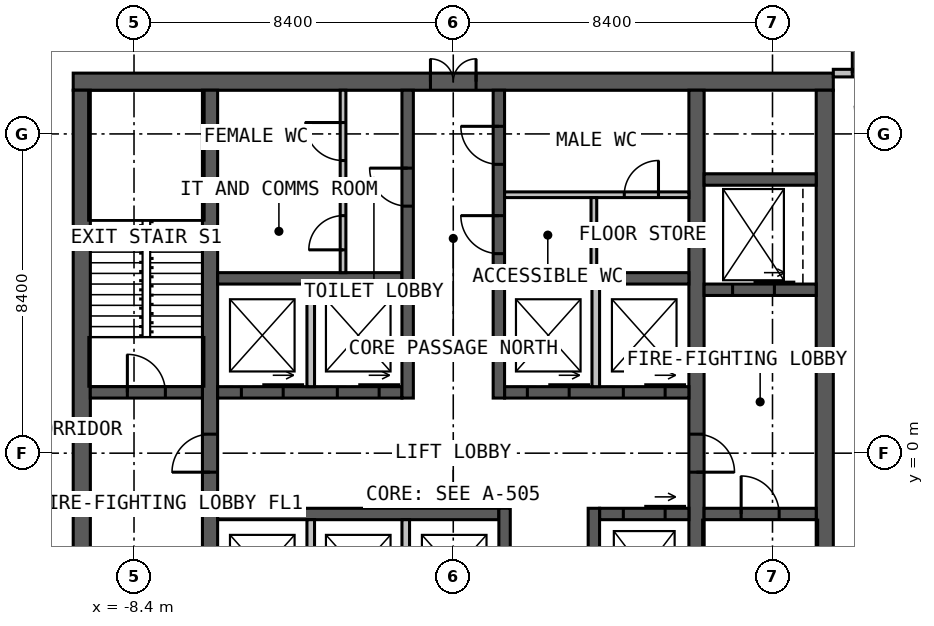
"""IFC4 building model, lengths in metres.
Left out: names, types, materials, properties, quantities, classifications, styles, units other than length and angle.
Written with IfcOpenShell. Run it as: python <this file> out.ifc"""

import sys

from ifc_helpers import new_model, si_unit, direction, frame, frame_2d, origin, place, context, subcontext, project, spatial, rectangle, extrude, element, fill, save


model = new_model("IFC4")
c1 = context("Model", 3, precision=1e-05, world=origin(), true_north=direction((0.0, 1.0)))
c2 = subcontext(c1, "Body", "Model", "MODEL_VIEW")
j1 = project(units=[si_unit("LENGTHUNIT", "METRE"), si_unit("PLANEANGLEUNIT", "RADIAN")], contexts=[c1])
p1 = place(None, origin())
s1 = spatial("IfcSite", under=j1, at=p1, CompositionType="ELEMENT")
p2 = place(p1, origin())
s2 = spatial("IfcBuilding", under=s1, at=p2, CompositionType="ELEMENT")
p3 = place(p2, frame((0.0, 0.0, 207.0)))
s3 = spatial("IfcBuildingStorey", under=s2, at=p3, CompositionType="ELEMENT", Elevation=207.0)
p4 = place(p3, frame((-10.0, 9.775, 0.0), z_axis=(0.0, 0.0, 1.0), x_axis=(1.0, 0.0, 0.0)))
e1 = element("IfcWall", 1, at=p4, inside=s3, PredefinedType="SOLIDWALL", context=c2, shape_type="SweptSolid", body=[
    extrude(rectangle(XDim=20.0, YDim=0.45, at=frame_2d((10.0, 0.0))), origin(), (0.0, 0.0, 1.0), 4.0),
])
p5 = place(p4, frame((9.4, 0.0, 0.0)))
e2 = element("IfcOpeningElement", 2, at=p5, cuts=e1, PredefinedType="OPENING", context=c2, shape_type="SweptSolid", body=[
    extrude(rectangle(XDim=1.2, YDim=2.2, at=frame_2d((0.6, 1.1))), frame((0.0, 0.235, 0.0), z_axis=(0.0, -1.0, 0.0), x_axis=(1.0, 0.0, 0.0)), (0.0, 0.0, 1.0), 0.47),
])
for number, where, z_axis, x_axis in (
    (3, (9.775, -9.55, 0.0), (0.0, 0.0, 1.0), (0.0, 1.0, 0.0)),
    (4, (-9.775, 9.55, 0.0), (0.0, 0.0, 1.0), (0.0, -1.0, 0.0)),
):
    element("IfcWall", number, at=place(p3, frame(where, z_axis=z_axis, x_axis=x_axis)), inside=s3, PredefinedType="SOLIDWALL", context=c2, shape_type="SweptSolid", body=[
        extrude(rectangle(XDim=19.1, YDim=0.45, at=frame_2d((9.55, 0.0))), origin(), (0.0, 0.0, 1.0), 4.0),
    ])
p6 = place(p3, frame((-6.4, -9.55, 0.0), z_axis=(0.0, 0.0, 1.0), x_axis=(0.0, 1.0, 0.0)))
e5 = element("IfcWall", 5, at=p6, inside=s3, PredefinedType="SOLIDWALL", context=c2, shape_type="SweptSolid", body=[
    extrude(rectangle(XDim=19.1, YDim=0.4, at=frame_2d((9.55, 0.0))), origin(), (0.0, 0.0, 1.0), 4.0),
])
p7 = place(p6, frame((9.05, 0.0, 0.0)))
e6 = element("IfcOpeningElement", 6, at=p7, cuts=e5, PredefinedType="OPENING", context=c2, shape_type="SweptSolid", body=[
    extrude(rectangle(XDim=1.0, YDim=2.2, at=frame_2d((0.5, 1.1))), frame((0.0, 0.21, 0.0), z_axis=(0.0, -1.0, 0.0), x_axis=(1.0, 0.0, 0.0)), (0.0, 0.0, 1.0), 0.42),
])
p8 = place(p3, frame((6.4, 9.55, 0.0), z_axis=(0.0, 0.0, 1.0), x_axis=(0.0, -1.0, 0.0)))
e7 = element("IfcWall", 7, at=p8, inside=s3, PredefinedType="SOLIDWALL", context=c2, shape_type="SweptSolid", body=[
    extrude(rectangle(XDim=19.1, YDim=0.4, at=frame_2d((9.55, 0.0))), origin(), (0.0, 0.0, 1.0), 4.0),
])
p9 = place(p8, frame((9.05, 0.0, 0.0)))
e8 = element("IfcOpeningElement", 8, at=p9, cuts=e7, PredefinedType="OPENING", context=c2, shape_type="SweptSolid", body=[
    extrude(rectangle(XDim=1.0, YDim=2.2, at=frame_2d((0.5, 1.1))), frame((0.0, 0.21, 0.0), z_axis=(0.0, -1.0, 0.0), x_axis=(1.0, 0.0, 0.0)), (0.0, 0.0, 1.0), 0.42),
])
p10 = place(p3, frame((-6.2, 1.6, 0.0), z_axis=(0.0, 0.0, 1.0), x_axis=(1.0, 0.0, 0.0)))
e9 = element("IfcWall", 9, at=p10, inside=s3, PredefinedType="SOLIDWALL", context=c2, shape_type="SweptSolid", body=[
    extrude(rectangle(XDim=4.85, YDim=0.3, at=frame_2d((2.425, 0.0))), origin(), (0.0, 0.0, 1.0), 4.0),
])
p11 = place(p10, frame((0.625, 0.0, 0.0)))
e10 = element("IfcOpeningElement", 10, at=p11, cuts=e9, PredefinedType="OPENING", context=c2, shape_type="SweptSolid", body=[
    extrude(rectangle(XDim=1.1, YDim=2.2, at=frame_2d((0.55, 1.1))), frame((0.0, 0.16, 0.0), z_axis=(0.0, -1.0, 0.0), x_axis=(1.0, 0.0, 0.0)), (0.0, 0.0, 1.0), 0.32),
])
p12 = place(p10, frame((3.15, 0.0, 0.0)))
e11 = element("IfcOpeningElement", 11, at=p12, cuts=e9, PredefinedType="OPENING", context=c2, shape_type="SweptSolid", body=[
    extrude(rectangle(XDim=1.1, YDim=2.2, at=frame_2d((0.55, 1.1))), frame((0.0, 0.16, 0.0), z_axis=(0.0, -1.0, 0.0), x_axis=(1.0, 0.0, 0.0)), (0.0, 0.0, 1.0), 0.32),
])
p13 = place(p3, frame((1.35, 1.6, 0.0), z_axis=(0.0, 0.0, 1.0), x_axis=(1.0, 0.0, 0.0)))
e12 = element("IfcWall", 12, at=p13, inside=s3, PredefinedType="SOLIDWALL", context=c2, shape_type="SweptSolid", body=[
    extrude(rectangle(XDim=4.85, YDim=0.3, at=frame_2d((2.425, 0.0))), origin(), (0.0, 0.0, 1.0), 4.0),
])
p14 = place(p13, frame((0.6, 0.0, 0.0)))
e13 = element("IfcOpeningElement", 13, at=p14, cuts=e12, PredefinedType="OPENING", context=c2, shape_type="SweptSolid", body=[
    extrude(rectangle(XDim=1.1, YDim=2.2, at=frame_2d((0.55, 1.1))), frame((0.0, 0.16, 0.0), z_axis=(0.0, -1.0, 0.0), x_axis=(1.0, 0.0, 0.0)), (0.0, 0.0, 1.0), 0.32),
])
p15 = place(p13, frame((3.125, 0.0, 0.0)))
e14 = element("IfcOpeningElement", 14, at=p15, cuts=e12, PredefinedType="OPENING", context=c2, shape_type="SweptSolid", body=[
    extrude(rectangle(XDim=1.1, YDim=2.2, at=frame_2d((0.55, 1.1))), frame((0.0, 0.16, 0.0), z_axis=(0.0, -1.0, 0.0), x_axis=(1.0, 0.0, 0.0)), (0.0, 0.0, 1.0), 0.32),
])
for number, where, z_axis, x_axis in (
    (15, (-6.2, 4.6, 0.0), (0.0, 0.0, 1.0), (1.0, 0.0, 0.0)),
    (16, (1.35, 4.6, 0.0), (0.0, 0.0, 1.0), (1.0, 0.0, 0.0)),
):
    element("IfcWall", number, at=place(p3, frame(where, z_axis=z_axis, x_axis=x_axis)), inside=s3, PredefinedType="SOLIDWALL", context=c2, shape_type="SweptSolid", body=[
        extrude(rectangle(XDim=4.85, YDim=0.3, at=frame_2d((2.425, 0.0))), origin(), (0.0, 0.0, 1.0), 4.0),
    ])
p16 = place(p3, frame((-1.2, 1.45, 0.0), z_axis=(0.0, 0.0, 1.0), x_axis=(0.0, 1.0, 0.0)))
e17 = element("IfcWall", 17, at=p16, inside=s3, PredefinedType="SOLIDWALL", context=c2, shape_type="SweptSolid", body=[
    extrude(rectangle(XDim=8.1, YDim=0.3, at=frame_2d((4.05, 0.0))), origin(), (0.0, 0.0, 1.0), 4.0),
])
p17 = place(p16, frame((5.05, 0.0, 0.0)))
e18 = element("IfcOpeningElement", 18, at=p17, cuts=e17, PredefinedType="OPENING", context=c2, shape_type="SweptSolid", body=[
    extrude(rectangle(XDim=1.0, YDim=2.2, at=frame_2d((0.5, 1.1))), frame((0.0, 0.16, 0.0), z_axis=(0.0, -1.0, 0.0), x_axis=(1.0, 0.0, 0.0)), (0.0, 0.0, 1.0), 0.32),
])
p18 = place(p3, frame((1.2, 1.45, 0.0), z_axis=(0.0, 0.0, 1.0), x_axis=(0.0, 1.0, 0.0)))
e19 = element("IfcWall", 19, at=p18, inside=s3, PredefinedType="SOLIDWALL", context=c2, shape_type="SweptSolid", body=[
    extrude(rectangle(XDim=8.1, YDim=0.3, at=frame_2d((4.05, 0.0))), origin(), (0.0, 0.0, 1.0), 4.0),
])
p19 = place(p18, frame((3.8, 0.0, 0.0)))
e20 = element("IfcOpeningElement", 20, at=p19, cuts=e19, PredefinedType="OPENING", context=c2, shape_type="SweptSolid", body=[
    extrude(rectangle(XDim=1.0, YDim=2.2, at=frame_2d((0.5, 1.1))), frame((0.0, 0.16, 0.0), z_axis=(0.0, -1.0, 0.0), x_axis=(1.0, 0.0, 0.0)), (0.0, 0.0, 1.0), 0.32),
])
p20 = place(p18, frame((6.15, 0.0, 0.0)))
e21 = element("IfcOpeningElement", 21, at=p20, cuts=e19, PredefinedType="OPENING", context=c2, shape_type="SweptSolid", body=[
    extrude(rectangle(XDim=1.0, YDim=2.2, at=frame_2d((0.5, 1.1))), frame((0.0, 0.16, 0.0), z_axis=(0.0, -1.0, 0.0), x_axis=(1.0, 0.0, 0.0)), (0.0, 0.0, 1.0), 0.32),
])
p21 = place(p3, frame((-6.2, -1.6, 0.0), z_axis=(0.0, 0.0, 1.0), x_axis=(1.0, 0.0, 0.0)))
e22 = element("IfcWall", 22, at=p21, inside=s3, PredefinedType="SOLIDWALL", context=c2, shape_type="SweptSolid", body=[
    extrude(rectangle(XDim=7.4, YDim=0.3, at=frame_2d((3.7, 0.0))), origin(), (0.0, 0.0, 1.0), 4.0),
])
p22 = place(p3, frame((3.85, -1.6, 0.0), z_axis=(0.0, 0.0, 1.0), x_axis=(1.0, 0.0, 0.0)))
e23 = element("IfcWall", 23, at=p22, inside=s3, PredefinedType="SOLIDWALL", context=c2, shape_type="SweptSolid", body=[
    extrude(rectangle(XDim=2.35, YDim=0.3, at=frame_2d((1.175, 0.0))), origin(), (0.0, 0.0, 1.0), 4.0),
])
p23 = place(p22, frame((0.625, 0.0, 0.0)))
e24 = element("IfcOpeningElement", 24, at=p23, cuts=e23, PredefinedType="OPENING", context=c2, shape_type="SweptSolid", body=[
    extrude(rectangle(XDim=1.1, YDim=2.2, at=frame_2d((0.55, 1.1))), frame((0.0, 0.16, 0.0), z_axis=(0.0, -1.0, 0.0), x_axis=(1.0, 0.0, 0.0)), (0.0, 0.0, 1.0), 0.32),
])
p24 = place(p3, frame((1.35, -1.45, 0.0), z_axis=(0.0, 0.0, 1.0), x_axis=(0.0, -1.0, 0.0)))
e25 = element("IfcWall", 25, at=p24, inside=s3, PredefinedType="SOLIDWALL", context=c2, shape_type="SweptSolid", body=[
    extrude(rectangle(XDim=8.1, YDim=0.3, at=frame_2d((4.05, 0.0))), origin(), (0.0, 0.0, 1.0), 4.0),
])
p25 = place(p24, frame((5.975, 0.0, 0.0)))
e26 = element("IfcOpeningElement", 26, at=p25, cuts=e25, PredefinedType="OPENING", context=c2, shape_type="SweptSolid", body=[
    extrude(rectangle(XDim=1.0, YDim=2.2, at=frame_2d((0.5, 1.1))), frame((0.0, 0.16, 0.0), z_axis=(0.0, -1.0, 0.0), x_axis=(1.0, 0.0, 0.0)), (0.0, 0.0, 1.0), 0.32),
])
p26 = place(p24, frame((3.525, 0.0, 0.0)))
e27 = element("IfcOpeningElement", 27, at=p26, cuts=e25, PredefinedType="OPENING", context=c2, shape_type="SweptSolid", body=[
    extrude(rectangle(XDim=0.9, YDim=2.2, at=frame_2d((0.45, 1.1))), frame((0.0, 0.16, 0.0), z_axis=(0.0, -1.0, 0.0), x_axis=(1.0, 0.0, 0.0)), (0.0, 0.0, 1.0), 0.32),
])
p27 = place(p3, frame((3.7, -1.45, 0.0), z_axis=(0.0, 0.0, 1.0), x_axis=(0.0, -1.0, 0.0)))
e28 = element("IfcWall", 28, at=p27, inside=s3, PredefinedType="SOLIDWALL", context=c2, shape_type="SweptSolid", body=[
    extrude(rectangle(XDim=8.1, YDim=0.3, at=frame_2d((4.05, 0.0))), origin(), (0.0, 0.0, 1.0), 4.0),
])
p28 = place(p27, frame((5.1, 0.0, 0.0)))
e29 = element("IfcOpeningElement", 29, at=p28, cuts=e28, PredefinedType="OPENING", context=c2, shape_type="SweptSolid", body=[
    extrude(rectangle(XDim=0.9, YDim=2.2, at=frame_2d((0.45, 1.1))), frame((0.0, 0.16, 0.0), z_axis=(0.0, -1.0, 0.0), x_axis=(1.0, 0.0, 0.0)), (0.0, 0.0, 1.0), 0.32),
])
p29 = place(p3, frame((-9.55, 1.6, 0.0), z_axis=(0.0, 0.0, 1.0), x_axis=(1.0, 0.0, 0.0)))
e30 = element("IfcWall", 30, at=p29, inside=s3, PredefinedType="SOLIDWALL", context=c2, shape_type="SweptSolid", body=[
    extrude(rectangle(XDim=2.95, YDim=0.3, at=frame_2d((1.475, 0.0))), origin(), (0.0, 0.0, 1.0), 4.0),
])
p30 = place(p29, frame((0.975, 0.0, 0.0)))
e31 = element("IfcOpeningElement", 31, at=p30, cuts=e30, PredefinedType="OPENING", context=c2, shape_type="SweptSolid", body=[
    extrude(rectangle(XDim=1.0, YDim=2.2, at=frame_2d((0.5, 1.1))), frame((0.0, 0.16, 0.0), z_axis=(0.0, -1.0, 0.0), x_axis=(1.0, 0.0, 0.0)), (0.0, 0.0, 1.0), 0.32),
])
p31 = place(p3, frame((6.6, -1.6, 0.0), z_axis=(0.0, 0.0, 1.0), x_axis=(1.0, 0.0, 0.0)))
e32 = element("IfcWall", 32, at=p31, inside=s3, PredefinedType="SOLIDWALL", context=c2, shape_type="SweptSolid", body=[
    extrude(rectangle(XDim=2.95, YDim=0.3, at=frame_2d((1.475, 0.0))), origin(), (0.0, 0.0, 1.0), 4.0),
])
p32 = place(p31, frame((0.975, 0.0, 0.0)))
e33 = element("IfcOpeningElement", 33, at=p32, cuts=e32, PredefinedType="OPENING", context=c2, shape_type="SweptSolid", body=[
    extrude(rectangle(XDim=1.0, YDim=2.2, at=frame_2d((0.5, 1.1))), frame((0.0, 0.16, 0.0), z_axis=(0.0, -1.0, 0.0), x_axis=(1.0, 0.0, 0.0)), (0.0, 0.0, 1.0), 0.32),
])
p33 = place(p3, frame((6.6, 4.3, 0.0), z_axis=(0.0, 0.0, 1.0), x_axis=(1.0, 0.0, 0.0)))
e34 = element("IfcWall", 34, at=p33, inside=s3, PredefinedType="SOLIDWALL", context=c2, shape_type="SweptSolid", body=[
    extrude(rectangle(XDim=2.95, YDim=0.3, at=frame_2d((1.475, 0.0))), origin(), (0.0, 0.0, 1.0), 4.0),
])
p34 = place(p33, frame((0.75, 0.0, 0.0)))
e35 = element("IfcOpeningElement", 35, at=p34, cuts=e34, PredefinedType="OPENING", context=c2, shape_type="SweptSolid", body=[
    extrude(rectangle(XDim=1.1, YDim=2.2, at=frame_2d((0.55, 1.1))), frame((0.0, 0.16, 0.0), z_axis=(0.0, -1.0, 0.0), x_axis=(1.0, 0.0, 0.0)), (0.0, 0.0, 1.0), 0.32),
])
p35 = place(p3, frame((6.6, 7.2, 0.0), z_axis=(0.0, 0.0, 1.0), x_axis=(1.0, 0.0, 0.0)))
e36 = element("IfcWall", 36, at=p35, inside=s3, PredefinedType="SOLIDWALL", context=c2, shape_type="SweptSolid", body=[
    extrude(rectangle(XDim=2.95, YDim=0.3, at=frame_2d((1.475, 0.0))), origin(), (0.0, 0.0, 1.0), 4.0),
])
for number, where, z_axis, x_axis in (
    (37, (-3.75, 1.75, 0.0), (0.0, 0.0, 1.0), (0.0, 1.0, 0.0)),
    (38, (3.75, 1.75, 0.0), (0.0, 0.0, 1.0), (0.0, 1.0, 0.0)),
    (39, (-3.75, -1.75, 0.0), (0.0, 0.0, 1.0), (0.0, -1.0, 0.0)),
    (40, (-1.25, -1.75, 0.0), (0.0, 0.0, 1.0), (0.0, -1.0, 0.0)),
):
    element("IfcWall", number, at=place(p3, frame(where, z_axis=z_axis, x_axis=x_axis)), inside=s3, PredefinedType="SOLIDWALL", context=c2, shape_type="SweptSolid", body=[
        extrude(rectangle(XDim=2.7, YDim=0.2, at=frame_2d((1.35, 0.0))), origin(), (0.0, 0.0, 1.0), 3.75),
    ])
p36 = place(p3, frame((1.35, 6.8, 0.0), z_axis=(0.0, 0.0, 1.0), x_axis=(1.0, 0.0, 0.0)))
e41 = element("IfcWall", 41, at=p36, inside=s3, PredefinedType="PARTITIONING", context=c2, shape_type="SweptSolid", body=[
    extrude(rectangle(XDim=4.85, YDim=0.15, at=frame_2d((2.425, 0.0))), origin(), (0.0, 0.0, 1.0), 3.75),
])
p37 = place(p36, frame((3.15, 0.0, 0.0)))
e42 = element("IfcOpeningElement", 42, at=p37, cuts=e41, PredefinedType="OPENING", context=c2, shape_type="SweptSolid", body=[
    extrude(rectangle(XDim=0.9, YDim=2.2, at=frame_2d((0.45, 1.1))), frame((0.0, 0.085, 0.0), z_axis=(0.0, -1.0, 0.0), x_axis=(1.0, 0.0, 0.0)), (0.0, 0.0, 1.0), 0.17),
])
p38 = place(p3, frame((3.7, 4.75, 0.0), z_axis=(0.0, 0.0, 1.0), x_axis=(0.0, 1.0, 0.0)))
e43 = element("IfcWall", 43, at=p38, inside=s3, PredefinedType="PARTITIONING", context=c2, shape_type="SweptSolid", body=[
    extrude(rectangle(XDim=1.975, YDim=0.15, at=frame_2d((0.988, 0.0))), origin(), (0.0, 0.0, 1.0), 3.75),
])
p39 = place(p3, frame((-2.9, 4.75, 0.0), z_axis=(0.0, 0.0, 1.0), x_axis=(0.0, 1.0, 0.0)))
e44 = element("IfcWall", 44, at=p39, inside=s3, PredefinedType="PARTITIONING", context=c2, shape_type="SweptSolid", body=[
    extrude(rectangle(XDim=4.8, YDim=0.15, at=frame_2d((2.4, 0.0))), origin(), (0.0, 0.0, 1.0), 3.75),
])
p40 = place(p39, frame((2.95, 0.0, 0.0)))
e45 = element("IfcOpeningElement", 45, at=p40, cuts=e44, PredefinedType="OPENING", context=c2, shape_type="SweptSolid", body=[
    extrude(rectangle(XDim=1.0, YDim=2.2, at=frame_2d((0.5, 1.1))), frame((0.0, 0.085, 0.0), z_axis=(0.0, -1.0, 0.0), x_axis=(1.0, 0.0, 0.0)), (0.0, 0.0, 1.0), 0.17),
])
p41 = place(p39, frame((0.6, 0.0, 0.0)))
e46 = element("IfcOpeningElement", 46, at=p41, cuts=e44, PredefinedType="OPENING", context=c2, shape_type="SweptSolid", body=[
    extrude(rectangle(XDim=0.9, YDim=2.2, at=frame_2d((0.45, 1.1))), frame((0.0, 0.085, 0.0), z_axis=(0.0, -1.0, 0.0), x_axis=(1.0, 0.0, 0.0)), (0.0, 0.0, 1.0), 0.17),
])
p42 = place(p3, frame((-6.2, 7.0, 0.0), z_axis=(0.0, 0.0, 1.0), x_axis=(1.0, 0.0, 0.0)))
e47 = element("IfcWall", 47, at=p42, inside=s3, PredefinedType="PARTITIONING", context=c2, shape_type="SweptSolid", body=[
    extrude(rectangle(XDim=3.225, YDim=0.15, at=frame_2d((1.612, 0.0))), origin(), (0.0, 0.0, 1.0), 3.75),
])
p43 = place(p3, frame((10.0, 10.0, 0.0), z_axis=(0.0, 0.0, 1.0), x_axis=(1.0, 0.0, 0.0)))
e48 = element("IfcWall", 48, at=p43, inside=s3, PredefinedType="PARTITIONING", context=c2, shape_type="SweptSolid", body=[
    extrude(rectangle(XDim=2.0, YDim=0.2, at=frame_2d((1.0, 0.0))), origin(), (0.0, 0.0, 1.0), 3.8),
])
p44 = place(p43, frame((0.5, 0.0, 0.0)))
e49 = element("IfcOpeningElement", 49, at=p44, cuts=e48, PredefinedType="OPENING", context=c2, shape_type="SweptSolid", body=[
    extrude(rectangle(XDim=1.0, YDim=2.2, at=frame_2d((0.5, 1.1))), frame((0.0, 0.11, 0.0), z_axis=(0.0, -1.0, 0.0), x_axis=(1.0, 0.0, 0.0)), (0.0, 0.0, 1.0), 0.22),
])
p45 = place(p5, origin())
e50 = element("IfcDoor", 50, at=p45, inside=s3, OperationType="DOUBLE_DOOR_SINGLE_SWING", PredefinedType="DOOR", context=c2, shape_type="SweptSolid", body=[
    extrude(rectangle(XDim=1.2, YDim=2.2, at=frame_2d((0.6, 1.1))), frame((0.0, 0.025, 0.0), z_axis=(0.0, -1.0, 0.0), x_axis=(1.0, 0.0, 0.0)), (0.0, 0.0, 1.0), 0.05),
])
fill(e2, e50)
p46 = place(p7, origin())
e51 = element("IfcDoor", 51, at=p46, inside=s3, OperationType="SINGLE_SWING_LEFT", PredefinedType="DOOR", context=c2, shape_type="SweptSolid", body=[
    extrude(rectangle(XDim=1.0, YDim=2.2, at=frame_2d((0.5, 1.1))), frame((0.0, 0.025, 0.0), z_axis=(0.0, -1.0, 0.0), x_axis=(1.0, 0.0, 0.0)), (0.0, 0.0, 1.0), 0.05),
])
fill(e6, e51)
p47 = place(p9, origin())
e52 = element("IfcDoor", 52, at=p47, inside=s3, OperationType="SINGLE_SWING_RIGHT", PredefinedType="DOOR", context=c2, shape_type="SweptSolid", body=[
    extrude(rectangle(XDim=1.0, YDim=2.2, at=frame_2d((0.5, 1.1))), frame((0.0, 0.025, 0.0), z_axis=(0.0, -1.0, 0.0), x_axis=(1.0, 0.0, 0.0)), (0.0, 0.0, 1.0), 0.05),
])
fill(e8, e52)
p48 = place(p30, origin())
e53 = element("IfcDoor", 53, at=p48, inside=s3, OperationType="SINGLE_SWING_LEFT", PredefinedType="DOOR", context=c2, shape_type="SweptSolid", body=[
    extrude(rectangle(XDim=1.0, YDim=2.2, at=frame_2d((0.5, 1.1))), frame((0.0, 0.025, 0.0), z_axis=(0.0, -1.0, 0.0), x_axis=(1.0, 0.0, 0.0)), (0.0, 0.0, 1.0), 0.05),
])
fill(e31, e53)
p49 = place(p32, origin())
e54 = element("IfcDoor", 54, at=p49, inside=s3, OperationType="SINGLE_SWING_LEFT", PredefinedType="DOOR", context=c2, shape_type="SweptSolid", body=[
    extrude(rectangle(XDim=1.0, YDim=2.2, at=frame_2d((0.5, 1.1))), frame((0.0, 0.025, 0.0), z_axis=(0.0, -1.0, 0.0), x_axis=(1.0, 0.0, 0.0)), (0.0, 0.0, 1.0), 0.05),
])
fill(e33, e54)
p50 = place(p17, origin())
e55 = element("IfcDoor", 55, at=p50, inside=s3, OperationType="SINGLE_SWING_RIGHT", PredefinedType="DOOR", context=c2, shape_type="SweptSolid", body=[
    extrude(rectangle(XDim=1.0, YDim=2.2, at=frame_2d((0.5, 1.1))), frame((0.0, 0.025, 0.0), z_axis=(0.0, -1.0, 0.0), x_axis=(1.0, 0.0, 0.0)), (0.0, 0.0, 1.0), 0.05),
])
fill(e18, e55)
p51 = place(p19, origin())
e56 = element("IfcDoor", 56, at=p51, inside=s3, OperationType="SINGLE_SWING_RIGHT", PredefinedType="DOOR", context=c2, shape_type="SweptSolid", body=[
    extrude(rectangle(XDim=1.0, YDim=2.2, at=frame_2d((0.5, 1.1))), frame((0.0, 0.025, 0.0), z_axis=(0.0, -1.0, 0.0), x_axis=(1.0, 0.0, 0.0)), (0.0, 0.0, 1.0), 0.05),
])
fill(e20, e56)
p52 = place(p20, origin())
e57 = element("IfcDoor", 57, at=p52, inside=s3, OperationType="SINGLE_SWING_RIGHT", PredefinedType="DOOR", context=c2, shape_type="SweptSolid", body=[
    extrude(rectangle(XDim=1.0, YDim=2.2, at=frame_2d((0.5, 1.1))), frame((0.0, 0.025, 0.0), z_axis=(0.0, -1.0, 0.0), x_axis=(1.0, 0.0, 0.0)), (0.0, 0.0, 1.0), 0.05),
])
fill(e21, e57)
p53 = place(p37, origin())
e58 = element("IfcDoor", 58, at=p53, inside=s3, OperationType="SINGLE_SWING_RIGHT", PredefinedType="DOOR", context=c2, shape_type="SweptSolid", body=[
    extrude(rectangle(XDim=0.9, YDim=2.2, at=frame_2d((0.45, 1.1))), frame((0.0, 0.025, 0.0), z_axis=(0.0, -1.0, 0.0), x_axis=(1.0, 0.0, 0.0)), (0.0, 0.0, 1.0), 0.05),
])
fill(e42, e58)
p54 = place(p40, origin())
e59 = element("IfcDoor", 59, at=p54, inside=s3, OperationType="SINGLE_SWING_RIGHT", PredefinedType="DOOR", context=c2, shape_type="SweptSolid", body=[
    extrude(rectangle(XDim=1.0, YDim=2.2, at=frame_2d((0.5, 1.1))), frame((0.0, 0.025, 0.0), z_axis=(0.0, -1.0, 0.0), x_axis=(1.0, 0.0, 0.0)), (0.0, 0.0, 1.0), 0.05),
])
fill(e45, e59)
p55 = place(p41, origin())
e60 = element("IfcDoor", 60, at=p55, inside=s3, OperationType="SINGLE_SWING_LEFT", PredefinedType="DOOR", context=c2, shape_type="SweptSolid", body=[
    extrude(rectangle(XDim=0.9, YDim=2.2, at=frame_2d((0.45, 1.1))), frame((0.0, 0.025, 0.0), z_axis=(0.0, -1.0, 0.0), x_axis=(1.0, 0.0, 0.0)), (0.0, 0.0, 1.0), 0.05),
])
fill(e46, e60)
p56 = place(p11, origin())
e61 = element("IfcDoor", 61, at=p56, inside=s3, OperationType="SLIDING_TO_LEFT", PredefinedType="DOOR", context=c2, shape_type="SweptSolid", body=[
    extrude(rectangle(XDim=1.1, YDim=2.2, at=frame_2d((0.55, 1.1))), frame((0.0, 0.025, 0.0), z_axis=(0.0, -1.0, 0.0), x_axis=(1.0, 0.0, 0.0)), (0.0, 0.0, 1.0), 0.05),
])
fill(e10, e61)
p57 = place(p12, origin())
e62 = element("IfcDoor", 62, at=p57, inside=s3, OperationType="SLIDING_TO_LEFT", PredefinedType="DOOR", context=c2, shape_type="SweptSolid", body=[
    extrude(rectangle(XDim=1.1, YDim=2.2, at=frame_2d((0.55, 1.1))), frame((0.0, 0.025, 0.0), z_axis=(0.0, -1.0, 0.0), x_axis=(1.0, 0.0, 0.0)), (0.0, 0.0, 1.0), 0.05),
])
fill(e11, e62)
p58 = place(p14, origin())
e63 = element("IfcDoor", 63, at=p58, inside=s3, OperationType="SLIDING_TO_LEFT", PredefinedType="DOOR", context=c2, shape_type="SweptSolid", body=[
    extrude(rectangle(XDim=1.1, YDim=2.2, at=frame_2d((0.55, 1.1))), frame((0.0, 0.025, 0.0), z_axis=(0.0, -1.0, 0.0), x_axis=(1.0, 0.0, 0.0)), (0.0, 0.0, 1.0), 0.05),
])
fill(e13, e63)
p59 = place(p15, origin())
e64 = element("IfcDoor", 64, at=p59, inside=s3, OperationType="SLIDING_TO_LEFT", PredefinedType="DOOR", context=c2, shape_type="SweptSolid", body=[
    extrude(rectangle(XDim=1.1, YDim=2.2, at=frame_2d((0.55, 1.1))), frame((0.0, 0.025, 0.0), z_axis=(0.0, -1.0, 0.0), x_axis=(1.0, 0.0, 0.0)), (0.0, 0.0, 1.0), 0.05),
])
fill(e14, e64)
p60 = place(p23, origin())
e65 = element("IfcDoor", 65, at=p60, inside=s3, OperationType="SLIDING_TO_LEFT", PredefinedType="DOOR", context=c2, shape_type="SweptSolid", body=[
    extrude(rectangle(XDim=1.1, YDim=2.2, at=frame_2d((0.55, 1.1))), frame((0.0, 0.025, 0.0), z_axis=(0.0, -1.0, 0.0), x_axis=(1.0, 0.0, 0.0)), (0.0, 0.0, 1.0), 0.05),
])
fill(e24, e65)
p61 = place(p34, origin())
e66 = element("IfcDoor", 66, at=p61, inside=s3, OperationType="SLIDING_TO_LEFT", PredefinedType="DOOR", context=c2, shape_type="SweptSolid", body=[
    extrude(rectangle(XDim=1.1, YDim=2.2, at=frame_2d((0.55, 1.1))), frame((0.0, 0.025, 0.0), z_axis=(0.0, -1.0, 0.0), x_axis=(1.0, 0.0, 0.0)), (0.0, 0.0, 1.0), 0.05),
])
fill(e35, e66)
p62 = place(p44, origin())
e67 = element("IfcDoor", 67, at=p62, inside=s3, OperationType="SINGLE_SWING_LEFT", PredefinedType="DOOR", context=c2, shape_type="SweptSolid", body=[
    extrude(rectangle(XDim=1.0, YDim=2.2, at=frame_2d((0.5, 1.1))), frame((0.0, 0.025, 0.0), z_axis=(0.0, -1.0, 0.0), x_axis=(1.0, 0.0, 0.0)), (0.0, 0.0, 1.0), 0.05),
])
fill(e49, e67)
save(model, sys.argv[1])
